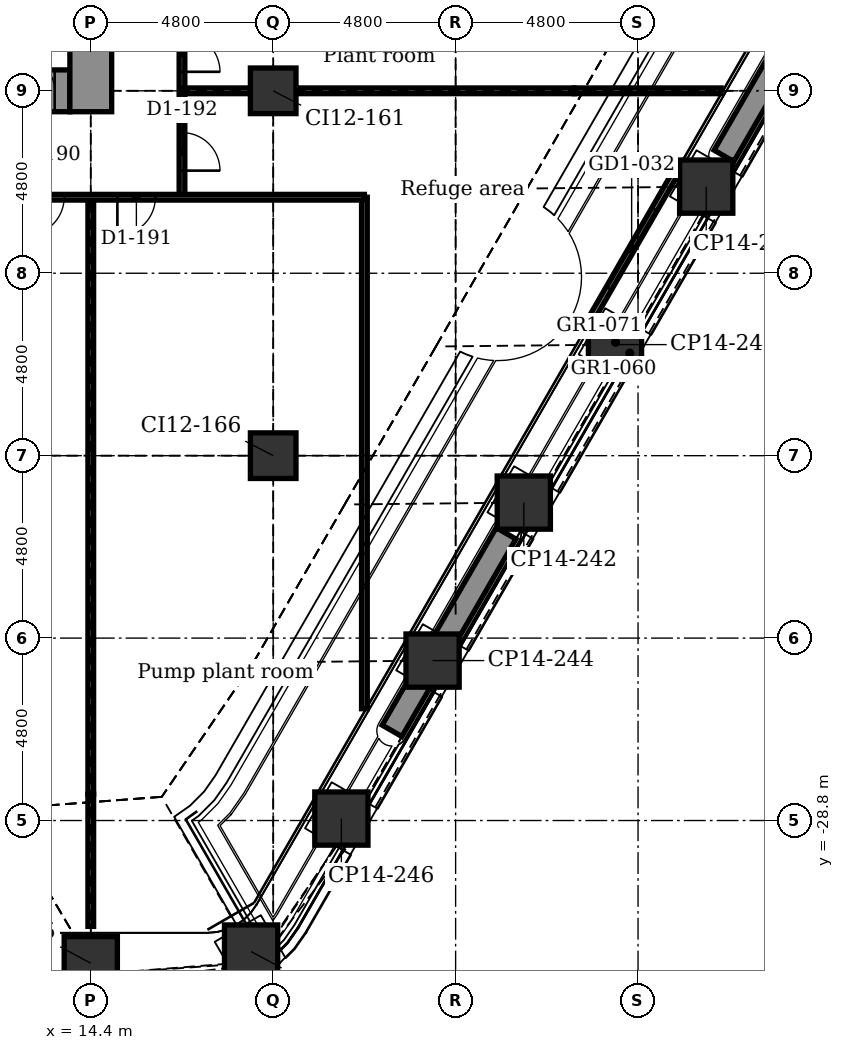
"""IFC4 building model, lengths in metres.
Left out: names, types, materials, properties, quantities, classifications, styles, units other than length and angle.
Written with IfcOpenShell. Run it as: python <this file> out.ifc"""

import sys

from ifc_helpers import new_model, si_unit, direction, frame, frame_2d, origin, origin_2d, place, context, subcontext, project, spatial, rectangle, extrude, element, fill, save


model = new_model("IFC4")
c1 = context("Model", 3, precision=1e-05, world=origin(), true_north=direction((0.0, 1.0)))
c2 = subcontext(c1, "Body", "Model", "MODEL_VIEW")
j1 = project(units=[si_unit("LENGTHUNIT", "METRE"), si_unit("PLANEANGLEUNIT", "RADIAN")], contexts=[c1])
p1 = place(None, origin())
s1 = spatial("IfcSite", under=j1, at=p1, CompositionType="ELEMENT")
p2 = place(p1, origin())
s2 = spatial("IfcBuilding", under=s1, at=p2, CompositionType="ELEMENT")
p3 = place(p2, frame((0.0, 0.0, 71.9)))
s3 = spatial("IfcBuildingStorey", under=s2, at=p3, CompositionType="ELEMENT", Elevation=71.9)
for number, where, z_axis, x_axis in (
    (1, (32.994, -7.964, -0.3), (0.0, 0.0, 1.0), (0.5, 0.866, 0.0)),
    (2, (30.594, -12.121, -0.3), (0.0, 0.0, 1.0), (0.5, 0.866, 0.0)),
    (3, (28.194, -16.278, -0.3), (0.0, 0.0, 1.0), (0.5, 0.866, 0.0)),
    (4, (25.794, -20.435, -0.3), (0.0, 0.0, 1.0), (0.5, 0.866, 0.0)),
    (5, (23.394, -24.592, -0.3), (0.0, 0.0, 1.0), (0.5, 0.866, 0.0)),
    (6, (20.994, -28.749, -0.3), (0.0, 0.0, 1.0), (0.5, 0.866, 0.0)),
    (7, (18.618, -32.247, -0.3), (0.0, 0.0, 1.0), (0.866, 0.5, 0.0)),
    (8, (14.4, -32.555, -0.3), (0.0, 0.0, 1.0), (1.0, 0.0, 0.0)),
):
    element("IfcColumn", number, at=place(p3, frame(where, z_axis=z_axis, x_axis=x_axis)), inside=s3, PredefinedType="COLUMN", context=c2, shape_type="SweptSolid", body=[
        extrude(rectangle(XDim=1.4, YDim=1.4, at=origin_2d()), origin(), (0.0, 0.0, 1.0), 6.1),
    ])
for number, where, z_axis, x_axis in (
    (9, (19.2, -19.2, -0.3), (0.0, 0.0, 1.0), (1.0, 0.0, 0.0)),
    (10, (19.2, -9.6, -0.3), (0.0, 0.0, 1.0), (1.0, 0.0, 0.0)),
):
    element("IfcColumn", number, at=place(p3, frame(where, z_axis=z_axis, x_axis=x_axis)), inside=s3, PredefinedType="COLUMN", context=c2, shape_type="SweptSolid", body=[
        extrude(rectangle(XDim=1.2, YDim=1.2, at=origin_2d()), origin(), (0.0, 0.0, 1.0), 6.1),
    ])
p4 = place(p3, frame((10.15, -9.6, -0.3), z_axis=(0.0, 0.0, 1.0), x_axis=(1.0, 0.0, 0.0)))
e11 = element("IfcWall", 11, at=p4, inside=s3, PredefinedType="SHEAR", context=c2, shape_type="SweptSolid", body=[
    extrude(rectangle(XDim=3.7, YDim=1.1, at=frame_2d((1.85, 0.0))), origin(), (0.0, 0.0, 1.0), 6.1),
])
p5 = place(p4, frame((0.05, 0.0, 0.3)))
e12 = element("IfcOpeningElement", 12, at=p5, cuts=e11, PredefinedType="OPENING", context=c2, shape_type="SweptSolid", body=[
    extrude(rectangle(XDim=0.9, YDim=2.1, at=frame_2d((0.45, 1.05))), frame((0.0, 0.56, 0.0), z_axis=(0.0, -1.0, 0.0), x_axis=(1.0, 0.0, 0.0)), (0.0, 0.0, 1.0), 1.12),
])
p6 = place(p4, frame((2.4, 0.0, 0.3)))
e13 = element("IfcOpeningElement", 13, at=p6, cuts=e11, PredefinedType="OPENING", context=c2, shape_type="SweptSolid", body=[
    extrude(rectangle(XDim=0.9, YDim=2.1, at=frame_2d((0.45, 1.05))), frame((0.0, 0.56, 0.0), z_axis=(0.0, -1.0, 0.0), x_axis=(1.0, 0.0, 0.0)), (0.0, 0.0, 1.0), 1.12),
])
p7 = place(p3, frame((14.4, -10.15, -0.3), z_axis=(0.0, 0.0, 1.0), x_axis=(0.0, 1.0, 0.0)))
e14 = element("IfcWall", 14, at=p7, inside=s3, PredefinedType="SHEAR", context=c2, shape_type="SweptSolid", body=[
    extrude(rectangle(XDim=20.3, YDim=1.1, at=frame_2d((10.15, 0.0))), origin(), (0.0, 0.0, 1.0), 6.1),
])
p8 = place(p7, frame((3.6, 0.0, 0.3)))
e15 = element("IfcOpeningElement", 15, at=p8, cuts=e14, PredefinedType="OPENING", context=c2, shape_type="SweptSolid", body=[
    extrude(rectangle(XDim=1.1, YDim=2.1, at=frame_2d((0.55, 1.05))), frame((0.0, 0.56, 0.0), z_axis=(0.0, -1.0, 0.0), x_axis=(1.0, 0.0, 0.0)), (0.0, 0.0, 1.0), 1.12),
])
p9 = place(p7, frame((6.0, 0.0, 0.3)))
e16 = element("IfcOpeningElement", 16, at=p9, cuts=e14, PredefinedType="OPENING", context=c2, shape_type="SweptSolid", body=[
    extrude(rectangle(XDim=1.1, YDim=2.1, at=frame_2d((0.55, 1.05))), frame((0.0, 0.56, 0.0), z_axis=(0.0, -1.0, 0.0), x_axis=(1.0, 0.0, 0.0)), (0.0, 0.0, 1.0), 1.12),
])
p10 = place(p7, frame((8.4, 0.0, 0.3)))
e17 = element("IfcOpeningElement", 17, at=p10, cuts=e14, PredefinedType="OPENING", context=c2, shape_type="SweptSolid", body=[
    extrude(rectangle(XDim=1.1, YDim=2.1, at=frame_2d((0.55, 1.05))), frame((0.0, 0.56, 0.0), z_axis=(0.0, -1.0, 0.0), x_axis=(1.0, 0.0, 0.0)), (0.0, 0.0, 1.0), 1.12),
])
p11 = place(p7, frame((10.8, 0.0, 0.3)))
e18 = element("IfcOpeningElement", 18, at=p11, cuts=e14, PredefinedType="OPENING", context=c2, shape_type="SweptSolid", body=[
    extrude(rectangle(XDim=1.1, YDim=2.1, at=frame_2d((0.55, 1.05))), frame((0.0, 0.56, 0.0), z_axis=(0.0, -1.0, 0.0), x_axis=(1.0, 0.0, 0.0)), (0.0, 0.0, 1.0), 1.12),
])
p12 = place(p3, frame((29.817, -11.707, 0.0), z_axis=(0.0, 0.0, 1.0), x_axis=(-0.499978080042, -0.866038058908, 0.0)))
e19 = element("IfcWall", 19, at=p12, inside=s3, PredefinedType="PARTITIONING", context=c2, shape_type="SweptSolid", body=[
    extrude(rectangle(XDim=4.74, YDim=0.16, at=frame_2d((2.37, 0.0))), origin(), (0.0, 0.0, 1.0), 5.7),
])
p13 = place(p12, frame((1.17, 0.0, 0.0)))
e20 = element("IfcOpeningElement", 20, at=p13, cuts=e19, PredefinedType="OPENING", context=c2, shape_type="SweptSolid", body=[
    extrude(rectangle(XDim=2.4, YDim=2.4, at=frame_2d((1.2, 1.2))), frame((0.0, 0.09, 0.0), z_axis=(0.0, -1.0, 0.0), x_axis=(1.0, 0.0, 0.0)), (0.0, 0.0, 1.0), 0.18),
])
for number, where, z_axis, x_axis in (
    (21, (34.061, -6.116, 6.0), (0.0, 0.0, 1.0), (-0.5, -0.866, 0.0)),
    (22, (25.327, -21.243, 6.0), (0.0, 0.0, 1.0), (-0.5, -0.866, 0.0)),
):
    element("IfcWall", number, at=place(p3, frame(where, z_axis=z_axis, x_axis=x_axis)), inside=s3, PredefinedType="USERDEFINED", context=c2, shape_type="SweptSolid", body=[
        extrude(rectangle(XDim=6.0, YDim=0.6, at=frame_2d((3.0, 0.0))), origin(), (0.0, 0.0, 1.0), 0.7),
    ])
p14 = place(p3, frame((21.6, -25.858, 0.0), z_axis=(0.0, 0.0, 1.0), x_axis=(0.0, 1.0, 0.0)))
e23 = element("IfcWall", 23, at=p14, inside=s3, PredefinedType="PARTITIONING", context=c2, shape_type="SweptSolid", body=[
    extrude(rectangle(XDim=13.458, YDim=0.15, at=frame_2d((6.729, 0.0))), origin(), (0.0, 0.0, 1.0), 5.7),
])
p15 = place(p3, frame((16.8, -12.4, 0.0), z_axis=(0.0, 0.0, 1.0), x_axis=(0.0, 1.0, 0.0)))
e24 = element("IfcWall", 24, at=p15, inside=s3, PredefinedType="PARTITIONING", context=c2, shape_type="SweptSolid", body=[
    extrude(rectangle(XDim=8.45, YDim=0.15, at=frame_2d((4.225, 0.0))), origin(), (0.0, 0.0, 1.0), 5.8),
])
p16 = place(p15, frame((0.7, 0.0, 0.0)))
e25 = element("IfcOpeningElement", 25, at=p16, cuts=e24, PredefinedType="OPENING", context=c2, shape_type="SweptSolid", body=[
    extrude(rectangle(XDim=1.0, YDim=2.1, at=frame_2d((0.5, 1.05))), frame((0.0, 0.085, 0.0), z_axis=(0.0, -1.0, 0.0), x_axis=(1.0, 0.0, 0.0)), (0.0, 0.0, 1.0), 0.17),
])
p17 = place(p15, frame((3.3, 0.0, 0.0)))
e26 = element("IfcOpeningElement", 26, at=p17, cuts=e24, PredefinedType="OPENING", context=c2, shape_type="SweptSolid", body=[
    extrude(rectangle(XDim=1.0, YDim=2.1, at=frame_2d((0.5, 1.05))), frame((0.0, 0.085, 0.0), z_axis=(0.0, -1.0, 0.0), x_axis=(1.0, 0.0, 0.0)), (0.0, 0.0, 1.0), 0.17),
])
p18 = place(p15, frame((6.2, 0.0, 0.0)))
e27 = element("IfcOpeningElement", 27, at=p18, cuts=e24, PredefinedType="OPENING", context=c2, shape_type="SweptSolid", body=[
    extrude(rectangle(XDim=1.0, YDim=2.1, at=frame_2d((0.5, 1.05))), frame((0.0, 0.085, 0.0), z_axis=(0.0, -1.0, 0.0), x_axis=(1.0, 0.0, 0.0)), (0.0, 0.0, 1.0), 0.17),
])
p19 = place(p3, frame((14.4, -28.107, 0.0), z_axis=(0.0, 0.0, 1.0), x_axis=(0.0, 1.0, 0.0)))
e28 = element("IfcWall", 28, at=p19, inside=s3, PredefinedType="PARTITIONING", context=c2, shape_type="SweptSolid", body=[
    extrude(rectangle(XDim=15.707, YDim=0.15, at=frame_2d((7.854, 0.0))), origin(), (0.0, 0.0, 1.0), 5.343),
])
p20 = place(p3, frame((14.4, -31.585, 0.0), z_axis=(0.0, 0.0, 1.0), x_axis=(0.0, 1.0, 0.0)))
e29 = element("IfcWall", 29, at=p20, inside=s3, PredefinedType="PARTITIONING", context=c2, shape_type="SweptSolid", body=[
    extrude(rectangle(XDim=3.479, YDim=0.15, at=frame_2d((1.739, 0.0))), origin(), (0.0, 0.0, 1.0), 5.8),
])
p21 = place(p3, frame((-16.8, -12.4, 0.0), z_axis=(0.0, 0.0, 1.0), x_axis=(1.0, 0.0, 0.0)))
e30 = element("IfcWall", 30, at=p21, inside=s3, PredefinedType="PARTITIONING", context=c2, shape_type="SweptSolid", body=[
    extrude(rectangle(XDim=38.4, YDim=0.15, at=frame_2d((19.2, 0.0))), origin(), (0.0, 0.0, 1.0), 5.8),
])
p22 = place(p21, frame((0.7, 0.0, 0.0)))
e31 = element("IfcOpeningElement", 31, at=p22, cuts=e30, PredefinedType="OPENING", context=c2, shape_type="SweptSolid", body=[
    extrude(rectangle(XDim=1.0, YDim=2.1, at=frame_2d((0.5, 1.05))), frame((0.0, 0.085, 0.0), z_axis=(0.0, -1.0, 0.0), x_axis=(1.0, 0.0, 0.0)), (0.0, 0.0, 1.0), 0.17),
])
p23 = place(p21, frame((3.1, 0.0, 0.0)))
e32 = element("IfcOpeningElement", 32, at=p23, cuts=e30, PredefinedType="OPENING", context=c2, shape_type="SweptSolid", body=[
    extrude(rectangle(XDim=1.0, YDim=2.1, at=frame_2d((0.5, 1.05))), frame((0.0, 0.085, 0.0), z_axis=(0.0, -1.0, 0.0), x_axis=(1.0, 0.0, 0.0)), (0.0, 0.0, 1.0), 0.17),
])
p24 = place(p21, frame((5.5, 0.0, 0.0)))
e33 = element("IfcOpeningElement", 33, at=p24, cuts=e30, PredefinedType="OPENING", context=c2, shape_type="SweptSolid", body=[
    extrude(rectangle(XDim=1.0, YDim=2.1, at=frame_2d((0.5, 1.05))), frame((0.0, 0.085, 0.0), z_axis=(0.0, -1.0, 0.0), x_axis=(1.0, 0.0, 0.0)), (0.0, 0.0, 1.0), 0.17),
])
p25 = place(p21, frame((11.095, 0.0, 0.0)))
e34 = element("IfcOpeningElement", 34, at=p25, cuts=e30, PredefinedType="OPENING", context=c2, shape_type="SweptSolid", body=[
    extrude(rectangle(XDim=1.0, YDim=2.1, at=frame_2d((0.5, 1.05))), frame((0.0, 0.085, 0.0), z_axis=(0.0, -1.0, 0.0), x_axis=(1.0, 0.0, 0.0)), (0.0, 0.0, 1.0), 0.17),
])
p26 = place(p21, frame((15.275, 0.0, 0.0)))
e35 = element("IfcOpeningElement", 35, at=p26, cuts=e30, PredefinedType="OPENING", context=c2, shape_type="SweptSolid", body=[
    extrude(rectangle(XDim=1.0, YDim=2.1, at=frame_2d((0.5, 1.05))), frame((0.0, 0.085, 0.0), z_axis=(0.0, -1.0, 0.0), x_axis=(1.0, 0.0, 0.0)), (0.0, 0.0, 1.0), 0.17),
])
p27 = place(p21, frame((23.5, 0.0, 0.0)))
e36 = element("IfcOpeningElement", 36, at=p27, cuts=e30, PredefinedType="OPENING", context=c2, shape_type="SweptSolid", body=[
    extrude(rectangle(XDim=1.0, YDim=2.1, at=frame_2d((0.5, 1.05))), frame((0.0, 0.085, 0.0), z_axis=(0.0, -1.0, 0.0), x_axis=(1.0, 0.0, 0.0)), (0.0, 0.0, 1.0), 0.17),
])
p28 = place(p21, frame((27.1, 0.0, 0.0)))
e37 = element("IfcOpeningElement", 37, at=p28, cuts=e30, PredefinedType="OPENING", context=c2, shape_type="SweptSolid", body=[
    extrude(rectangle(XDim=1.0, YDim=2.1, at=frame_2d((0.5, 1.05))), frame((0.0, 0.085, 0.0), z_axis=(0.0, -1.0, 0.0), x_axis=(1.0, 0.0, 0.0)), (0.0, 0.0, 1.0), 0.17),
])
p29 = place(p21, frame((29.5, 0.0, 0.0)))
e38 = element("IfcOpeningElement", 38, at=p29, cuts=e30, PredefinedType="OPENING", context=c2, shape_type="SweptSolid", body=[
    extrude(rectangle(XDim=1.0, YDim=2.1, at=frame_2d((0.5, 1.05))), frame((0.0, 0.085, 0.0), z_axis=(0.0, -1.0, 0.0), x_axis=(1.0, 0.0, 0.0)), (0.0, 0.0, 1.0), 0.17),
])
p30 = place(p21, frame((31.9, 0.0, 0.0)))
e39 = element("IfcOpeningElement", 39, at=p30, cuts=e30, PredefinedType="OPENING", context=c2, shape_type="SweptSolid", body=[
    extrude(rectangle(XDim=1.0, YDim=2.1, at=frame_2d((0.5, 1.05))), frame((0.0, 0.085, 0.0), z_axis=(0.0, -1.0, 0.0), x_axis=(1.0, 0.0, 0.0)), (0.0, 0.0, 1.0), 0.17),
])
p31 = place(p3, frame((16.8, -9.6, 0.0), z_axis=(0.0, 0.0, 1.0), x_axis=(1.0, 0.0, 0.0)))
e40 = element("IfcWall", 40, at=p31, inside=s3, PredefinedType="PARTITIONING", context=c2, shape_type="SweptSolid", body=[
    extrude(rectangle(XDim=1.8, YDim=0.15, at=frame_2d((0.9, 0.0))), origin(), (0.0, 0.0, 1.0), 5.192),
])
p32 = place(p3, frame((19.8, -9.6, 0.0), z_axis=(0.0, 0.0, 1.0), x_axis=(1.0, 0.0, 0.0)))
e41 = element("IfcWall", 41, at=p32, inside=s3, PredefinedType="PARTITIONING", context=c2, shape_type="SweptSolid", body=[
    extrude(rectangle(XDim=7.316, YDim=0.15, at=frame_2d((3.658, 0.0))), origin(), (0.0, 0.0, 1.0), 5.192),
])
p33 = place(p3, frame((27.116, -9.6, 0.0), z_axis=(0.0, 0.0, 1.0), x_axis=(1.0, 0.0, 0.0)))
e42 = element("IfcWall", 42, at=p33, inside=s3, PredefinedType="PARTITIONING", context=c2, shape_type="SweptSolid", body=[
    extrude(rectangle(XDim=3.871, YDim=0.15, at=frame_2d((1.936, 0.0))), origin(), (0.0, 0.0, 1.0), 5.7),
])
p34 = place(p13, origin())
e43 = element("IfcDoor", 43, at=p34, inside=s3, OperationType="DOUBLE_DOOR_SLIDING", PredefinedType="DOOR", context=c2, shape_type="SweptSolid", body=[
    extrude(rectangle(XDim=2.4, YDim=2.4, at=frame_2d((1.2, 1.2))), frame((0.0, 0.025, 0.0), z_axis=(0.0, -1.0, 0.0), x_axis=(1.0, 0.0, 0.0)), (0.0, 0.0, 1.0), 0.05),
])
fill(e20, e43)
p35 = place(p29, frame((1.0, 0.0, 0.0), z_axis=(0.0, 0.0, 1.0), x_axis=(-1.0, 0.0, 0.0)))
e44 = element("IfcDoor", 44, at=p35, inside=s3, OperationType="SINGLE_SWING_LEFT", PredefinedType="DOOR", context=c2, shape_type="SweptSolid", body=[
    extrude(rectangle(XDim=1.0, YDim=2.1, at=frame_2d((0.5, 1.05))), frame((0.0, 0.025, 0.0), z_axis=(0.0, -1.0, 0.0), x_axis=(1.0, 0.0, 0.0)), (0.0, 0.0, 1.0), 0.05),
])
fill(e38, e44)
p36 = place(p30, frame((1.0, 0.0, 0.0), z_axis=(0.0, 0.0, 1.0), x_axis=(-1.0, 0.0, 0.0)))
e45 = element("IfcDoor", 45, at=p36, inside=s3, OperationType="SINGLE_SWING_LEFT", PredefinedType="DOOR", context=c2, shape_type="SweptSolid", body=[
    extrude(rectangle(XDim=1.0, YDim=2.1, at=frame_2d((0.5, 1.05))), frame((0.0, 0.025, 0.0), z_axis=(0.0, -1.0, 0.0), x_axis=(1.0, 0.0, 0.0)), (0.0, 0.0, 1.0), 0.05),
])
fill(e39, e45)
p37 = place(p16, frame((1.0, 0.0, 0.0), z_axis=(0.0, 0.0, 1.0), x_axis=(-1.0, 0.0, 0.0)))
e46 = element("IfcDoor", 46, at=p37, inside=s3, OperationType="SINGLE_SWING_LEFT", PredefinedType="DOOR", context=c2, shape_type="SweptSolid", body=[
    extrude(rectangle(XDim=1.0, YDim=2.1, at=frame_2d((0.5, 1.05))), frame((0.0, 0.025, 0.0), z_axis=(0.0, -1.0, 0.0), x_axis=(1.0, 0.0, 0.0)), (0.0, 0.0, 1.0), 0.05),
])
fill(e25, e46)
p38 = place(p17, frame((1.0, 0.0, 0.0), z_axis=(0.0, 0.0, 1.0), x_axis=(-1.0, 0.0, 0.0)))
e47 = element("IfcDoor", 47, at=p38, inside=s3, OperationType="SINGLE_SWING_LEFT", PredefinedType="DOOR", context=c2, shape_type="SweptSolid", body=[
    extrude(rectangle(XDim=1.0, YDim=2.1, at=frame_2d((0.5, 1.05))), frame((0.0, 0.025, 0.0), z_axis=(0.0, -1.0, 0.0), x_axis=(1.0, 0.0, 0.0)), (0.0, 0.0, 1.0), 0.05),
])
fill(e26, e47)
p39 = place(p6, origin())
e48 = element("IfcDoor", 48, at=p39, inside=s3, OperationType="SINGLE_SWING_LEFT", PredefinedType="DOOR", context=c2, shape_type="SweptSolid", body=[
    extrude(rectangle(XDim=0.9, YDim=2.1, at=frame_2d((0.45, 1.05))), frame((0.0, 0.025, 0.0), z_axis=(0.0, -1.0, 0.0), x_axis=(1.0, 0.0, 0.0)), (0.0, 0.0, 1.0), 0.05),
])
fill(e13, e48)
save(model, sys.argv[1])
